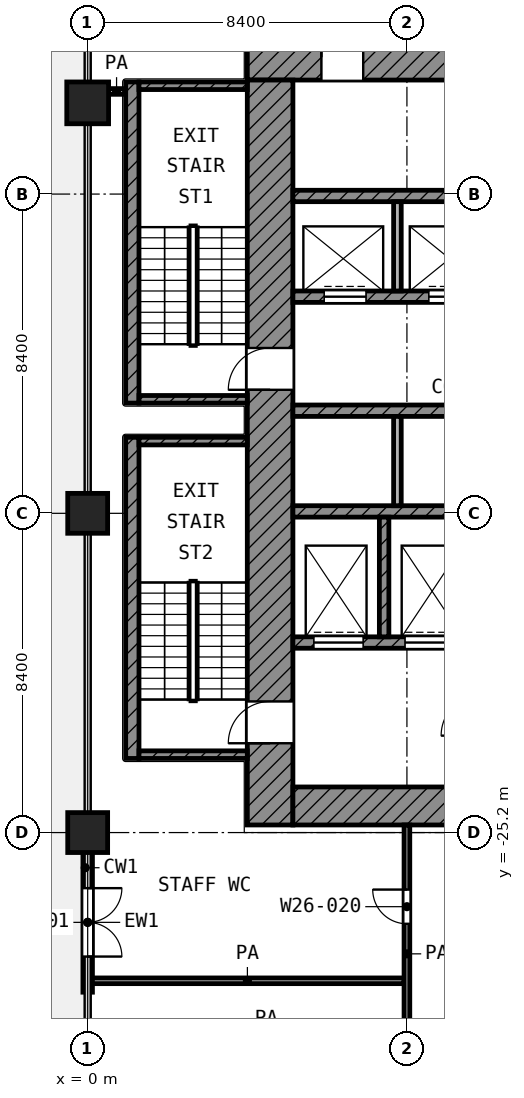
"""IFC4 building model, lengths in metres.
Left out: names, types, materials, properties, quantities, classifications, styles, units other than length and angle.
Written with IfcOpenShell. Run it as: python <this file> out.ifc"""

import sys

from ifc_helpers import new_model, si_unit, direction, frame, frame_2d, origin, origin_2d, place, context, subcontext, project, spatial, rectangle, extrude, element, fill, save


model = new_model("IFC4")
c1 = context("Model", 3, precision=1e-05, world=origin(), true_north=direction((0.0, 1.0)))
c2 = subcontext(c1, "Body", "Model", "MODEL_VIEW")
j1 = project(units=[si_unit("LENGTHUNIT", "METRE"), si_unit("PLANEANGLEUNIT", "RADIAN")], contexts=[c1])
p1 = place(None, origin())
s1 = spatial("IfcSite", under=j1, at=p1, CompositionType="ELEMENT")
p2 = place(p1, origin())
s2 = spatial("IfcBuilding", under=s1, at=p2, CompositionType="ELEMENT")
p3 = place(p2, frame((0.0, 0.0, 115.6)))
s3 = spatial("IfcBuildingStorey", under=s2, at=p3, CompositionType="ELEMENT", Elevation=115.6)
p4 = place(p3, frame((0.0, -6.0, 0.0), z_axis=(0.0, 0.0, 1.0), x_axis=(1.0, 0.0, 0.0)))
e1 = element("IfcColumn", 1, at=p4, inside=s3, PredefinedType="COLUMN", context=c2, shape_type="SweptSolid", body=[
    extrude(rectangle(XDim=1.1, YDim=1.1, at=origin_2d()), origin(), (0.0, 0.0, 1.0), 4.2),
])
for number, where, z_axis, x_axis in (
    (2, (0.0, -16.8, 0.0), (0.0, 0.0, 1.0), (1.0, 0.0, 0.0)),
    (3, (0.0, -25.2, 0.0), (0.0, 0.0, 1.0), (1.0, 0.0, 0.0)),
):
    element("IfcColumn", number, at=place(p3, frame(where, z_axis=z_axis, x_axis=x_axis)), inside=s3, PredefinedType="COLUMN", context=c2, shape_type="SweptSolid", body=[
        extrude(rectangle(XDim=1.05, YDim=1.05, at=origin_2d()), origin(), (0.0, 0.0, 1.0), 4.2),
    ])
p5 = place(p3, frame((0.0, -25.725, 0.0), z_axis=(0.0, 0.0, 1.0), x_axis=(0.0, -1.0, 0.0)))
e4 = element("IfcWall", 4, at=p5, inside=s3, PredefinedType="SOLIDWALL", context=c2, shape_type="SweptSolid", body=[
    extrude(rectangle(XDim=3.675, YDim=0.25, at=frame_2d((1.837, 0.0))), origin(), (0.0, 0.0, 1.0), 3.48),
])
p6 = place(p5, frame((0.938, 0.0, 0.0)))
e5 = element("IfcOpeningElement", 5, at=p6, cuts=e4, PredefinedType="OPENING", context=c2, shape_type="SweptSolid", body=[
    extrude(rectangle(XDim=1.8, YDim=2.1, at=frame_2d((0.9, 1.05))), frame((0.0, 0.135, 0.0), z_axis=(0.0, -1.0, 0.0), x_axis=(1.0, 0.0, 0.0)), (0.0, 0.0, 1.0), 0.27),
])
p7 = place(p3, frame((4.2, -4.8, 0.0), z_axis=(0.0, 0.0, 1.0), x_axis=(1.0, 0.0, 0.0)))
e6 = element("IfcWall", 6, at=p7, inside=s3, PredefinedType="SHEAR", context=c2, shape_type="SweptSolid", body=[
    extrude(rectangle(XDim=20.8, YDim=1.2, at=frame_2d((10.4, 0.0))), origin(), (0.0, 0.0, 1.0), 3.6),
])
p8 = place(p7, frame((1.95, 0.0, 0.0)))
e7 = element("IfcOpeningElement", 7, at=p8, cuts=e6, PredefinedType="OPENING", context=c2, shape_type="SweptSolid", body=[
    extrude(rectangle(XDim=1.1, YDim=2.1, at=frame_2d((0.55, 1.05))), frame((0.0, 0.61, 0.0), z_axis=(0.0, -1.0, 0.0), x_axis=(1.0, 0.0, 0.0)), (0.0, 0.0, 1.0), 1.22),
])
p9 = place(p7, frame((17.95, 0.0, 0.0)))
e8 = element("IfcOpeningElement", 8, at=p9, cuts=e6, PredefinedType="OPENING", context=c2, shape_type="SweptSolid", body=[
    extrude(rectangle(XDim=1.1, YDim=2.1, at=frame_2d((0.55, 1.05))), frame((0.0, 0.61, 0.0), z_axis=(0.0, -1.0, 0.0), x_axis=(1.0, 0.0, 0.0)), (0.0, 0.0, 1.0), 1.22),
])
p10 = place(p3, frame((4.8, -25.0, 0.0), z_axis=(0.0, 0.0, 1.0), x_axis=(0.0, 1.0, 0.0)))
e9 = element("IfcWall", 9, at=p10, inside=s3, PredefinedType="SHEAR", context=c2, shape_type="SweptSolid", body=[
    extrude(rectangle(XDim=19.6, YDim=1.2, at=frame_2d((9.8, 0.0))), origin(), (0.0, 0.0, 1.0), 3.6),
])
p11 = place(p10, frame((11.45, 0.0, 0.0)))
e10 = element("IfcOpeningElement", 10, at=p11, cuts=e9, PredefinedType="OPENING", context=c2, shape_type="SweptSolid", body=[
    extrude(rectangle(XDim=1.1, YDim=2.1, at=frame_2d((0.55, 1.05))), frame((0.0, 0.61, 0.0), z_axis=(0.0, -1.0, 0.0), x_axis=(1.0, 0.0, 0.0)), (0.0, 0.0, 1.0), 1.22),
])
p12 = place(p10, frame((2.15, 0.0, 0.0)))
e11 = element("IfcOpeningElement", 11, at=p12, cuts=e9, PredefinedType="OPENING", context=c2, shape_type="SweptSolid", body=[
    extrude(rectangle(XDim=1.1, YDim=2.1, at=frame_2d((0.55, 1.05))), frame((0.0, 0.61, 0.0), z_axis=(0.0, -1.0, 0.0), x_axis=(1.0, 0.0, 0.0)), (0.0, 0.0, 1.0), 1.22),
])
p13 = place(p3, frame((5.4, -24.5, 0.0), z_axis=(0.0, 0.0, 1.0), x_axis=(1.0, 0.0, 0.0)))
e12 = element("IfcWall", 12, at=p13, inside=s3, PredefinedType="SHEAR", context=c2, shape_type="SweptSolid", body=[
    extrude(rectangle(XDim=18.6, YDim=1.0, at=frame_2d((9.3, 0.0))), origin(), (0.0, 0.0, 1.0), 3.6),
])
p14 = place(p13, frame((6.3, 0.0, 0.0)))
e13 = element("IfcOpeningElement", 13, at=p14, cuts=e12, PredefinedType="OPENING", context=c2, shape_type="SweptSolid", body=[
    extrude(rectangle(XDim=1.8, YDim=2.1, at=frame_2d((0.9, 1.05))), frame((0.0, 0.51, 0.0), z_axis=(0.0, -1.0, 0.0), x_axis=(1.0, 0.0, 0.0)), (0.0, 0.0, 1.0), 1.02),
])
p15 = place(p3, frame((5.4, -8.45, 0.0), z_axis=(0.0, 0.0, 1.0), x_axis=(1.0, 0.0, 0.0)))
e14 = element("IfcWall", 14, at=p15, inside=s3, PredefinedType="SHEAR", context=c2, shape_type="SweptSolid", body=[
    extrude(rectangle(XDim=16.65, YDim=0.3, at=frame_2d((8.325, 0.0))), origin(), (0.0, 0.0, 1.0), 3.6),
])
p16 = place(p3, frame((5.4, -11.1, 0.0), z_axis=(0.0, 0.0, 1.0), x_axis=(1.0, 0.0, 0.0)))
e15 = element("IfcWall", 15, at=p16, inside=s3, PredefinedType="SHEAR", context=c2, shape_type="SweptSolid", body=[
    extrude(rectangle(XDim=16.65, YDim=0.3, at=frame_2d((8.325, 0.0))), origin(), (0.0, 0.0, 1.0), 3.6),
])
p17 = place(p16, frame((0.825, 0.0, 0.0)))
e16 = element("IfcOpeningElement", 16, at=p17, cuts=e15, PredefinedType="OPENING", context=c2, shape_type="SweptSolid", body=[
    extrude(rectangle(XDim=1.1, YDim=2.1, at=frame_2d((0.55, 1.05))), frame((0.0, 0.16, 0.0), z_axis=(0.0, -1.0, 0.0), x_axis=(1.0, 0.0, 0.0)), (0.0, 0.0, 1.0), 0.32),
])
p18 = place(p16, frame((3.575, 0.0, 0.0)))
e17 = element("IfcOpeningElement", 17, at=p18, cuts=e15, PredefinedType="OPENING", context=c2, shape_type="SweptSolid", body=[
    extrude(rectangle(XDim=1.1, YDim=2.1, at=frame_2d((0.55, 1.05))), frame((0.0, 0.16, 0.0), z_axis=(0.0, -1.0, 0.0), x_axis=(1.0, 0.0, 0.0)), (0.0, 0.0, 1.0), 0.32),
])
p19 = place(p16, frame((6.325, 0.0, 0.0)))
e18 = element("IfcOpeningElement", 18, at=p19, cuts=e15, PredefinedType="OPENING", context=c2, shape_type="SweptSolid", body=[
    extrude(rectangle(XDim=1.1, YDim=2.1, at=frame_2d((0.55, 1.05))), frame((0.0, 0.16, 0.0), z_axis=(0.0, -1.0, 0.0), x_axis=(1.0, 0.0, 0.0)), (0.0, 0.0, 1.0), 0.32),
])
p20 = place(p16, frame((9.075, 0.0, 0.0)))
e19 = element("IfcOpeningElement", 19, at=p20, cuts=e15, PredefinedType="OPENING", context=c2, shape_type="SweptSolid", body=[
    extrude(rectangle(XDim=1.1, YDim=2.1, at=frame_2d((0.55, 1.05))), frame((0.0, 0.16, 0.0), z_axis=(0.0, -1.0, 0.0), x_axis=(1.0, 0.0, 0.0)), (0.0, 0.0, 1.0), 0.32),
])
for number, where, z_axis, x_axis in (
    (20, (5.4, -14.1, 0.0), (0.0, 0.0, 1.0), (1.0, 0.0, 0.0)),
    (21, (5.4, -16.75, 0.0), (0.0, 0.0, 1.0), (1.0, 0.0, 0.0)),
):
    element("IfcWall", number, at=place(p3, frame(where, z_axis=z_axis, x_axis=x_axis)), inside=s3, PredefinedType="SHEAR", context=c2, shape_type="SweptSolid", body=[
        extrude(rectangle(XDim=16.65, YDim=0.3, at=frame_2d((8.325, 0.0))), origin(), (0.0, 0.0, 1.0), 3.6),
    ])
p21 = place(p3, frame((5.4, -20.2, 0.0), z_axis=(0.0, 0.0, 1.0), x_axis=(1.0, 0.0, 0.0)))
e22 = element("IfcWall", 22, at=p21, inside=s3, PredefinedType="SHEAR", context=c2, shape_type="SweptSolid", body=[
    extrude(rectangle(XDim=14.65, YDim=0.3, at=frame_2d((7.325, 0.0))), origin(), (0.0, 0.0, 1.0), 3.6),
])
p22 = place(p21, frame((10.55, 0.0, 0.0)))
e23 = element("IfcOpeningElement", 23, at=p22, cuts=e22, PredefinedType="OPENING", context=c2, shape_type="SweptSolid", body=[
    extrude(rectangle(XDim=1.3, YDim=2.1, at=frame_2d((0.65, 1.05))), frame((0.0, 0.16, 0.0), z_axis=(0.0, -1.0, 0.0), x_axis=(1.0, 0.0, 0.0)), (0.0, 0.0, 1.0), 0.32),
])
p23 = place(p21, frame((12.95, 0.0, 0.0)))
e24 = element("IfcOpeningElement", 24, at=p23, cuts=e22, PredefinedType="OPENING", context=c2, shape_type="SweptSolid", body=[
    extrude(rectangle(XDim=1.3, YDim=2.1, at=frame_2d((0.65, 1.05))), frame((0.0, 0.16, 0.0), z_axis=(0.0, -1.0, 0.0), x_axis=(1.0, 0.0, 0.0)), (0.0, 0.0, 1.0), 0.32),
])
p24 = place(p21, frame((0.55, 0.0, 0.0)))
e25 = element("IfcOpeningElement", 25, at=p24, cuts=e22, PredefinedType="OPENING", context=c2, shape_type="SweptSolid", body=[
    extrude(rectangle(XDim=1.3, YDim=2.1, at=frame_2d((0.65, 1.05))), frame((0.0, 0.16, 0.0), z_axis=(0.0, -1.0, 0.0), x_axis=(1.0, 0.0, 0.0)), (0.0, 0.0, 1.0), 0.32),
])
p25 = place(p21, frame((2.95, 0.0, 0.0)))
e26 = element("IfcOpeningElement", 26, at=p25, cuts=e22, PredefinedType="OPENING", context=c2, shape_type="SweptSolid", body=[
    extrude(rectangle(XDim=1.3, YDim=2.1, at=frame_2d((0.65, 1.05))), frame((0.0, 0.16, 0.0), z_axis=(0.0, -1.0, 0.0), x_axis=(1.0, 0.0, 0.0)), (0.0, 0.0, 1.0), 0.32),
])
p26 = place(p21, frame((6.55, 0.0, 0.0)))
e27 = element("IfcOpeningElement", 27, at=p26, cuts=e22, PredefinedType="OPENING", context=c2, shape_type="SweptSolid", body=[
    extrude(rectangle(XDim=0.9, YDim=2.1, at=frame_2d((0.45, 1.05))), frame((0.0, 0.16, 0.0), z_axis=(0.0, -1.0, 0.0), x_axis=(1.0, 0.0, 0.0)), (0.0, 0.0, 1.0), 0.32),
])
p27 = place(p21, frame((8.95, 0.0, 0.0)))
e28 = element("IfcOpeningElement", 28, at=p27, cuts=e22, PredefinedType="OPENING", context=c2, shape_type="SweptSolid", body=[
    extrude(rectangle(XDim=0.9, YDim=2.1, at=frame_2d((0.45, 1.05))), frame((0.0, 0.16, 0.0), z_axis=(0.0, -1.0, 0.0), x_axis=(1.0, 0.0, 0.0)), (0.0, 0.0, 1.0), 0.32),
])
p28 = place(p3, frame((7.8, -20.05, 0.0), z_axis=(0.0, 0.0, 1.0), x_axis=(0.0, 1.0, 0.0)))
e29 = element("IfcWall", 29, at=p28, inside=s3, PredefinedType="SHEAR", context=c2, shape_type="SweptSolid", body=[
    extrude(rectangle(XDim=3.15, YDim=0.25, at=frame_2d((1.575, 0.0))), origin(), (0.0, 0.0, 1.0), 3.6),
])
p29 = place(p3, frame((8.15, -10.95, 0.0), z_axis=(0.0, 0.0, 1.0), x_axis=(0.0, 1.0, 0.0)))
e30 = element("IfcWall", 30, at=p29, inside=s3, PredefinedType="PARTITIONING", context=c2, shape_type="SweptSolid", body=[
    extrude(rectangle(XDim=2.35, YDim=0.2, at=frame_2d((1.175, 0.0))), origin(), (0.0, 0.0, 1.0), 3.6),
])
p30 = place(p3, frame((8.15, -16.6, 0.0), z_axis=(0.0, 0.0, 1.0), x_axis=(0.0, 1.0, 0.0)))
e31 = element("IfcWall", 31, at=p30, inside=s3, PredefinedType="PARTITIONING", context=c2, shape_type="SweptSolid", body=[
    extrude(rectangle(XDim=2.35, YDim=0.2, at=frame_2d((1.175, 0.0))), origin(), (0.0, 0.0, 1.0), 3.6),
])
p31 = place(p3, frame((1.175, -13.9, 0.0), z_axis=(0.0, 0.0, 1.0), x_axis=(0.0, 1.0, 0.0)))
e32 = element("IfcWall", 32, at=p31, inside=s3, PredefinedType="SHEAR", context=c2, shape_type="SweptSolid", body=[
    extrude(rectangle(XDim=8.45, YDim=0.35, at=frame_2d((4.225, 0.0))), origin(), (0.0, 0.0, 1.0), 3.6),
])
for number, where, z_axis, x_axis in (
    (33, (1.35, -5.55, 0.0), (0.0, 0.0, 1.0), (1.0, 0.0, 0.0)),
    (34, (1.35, -13.8, 0.0), (0.0, 0.0, 1.0), (1.0, 0.0, 0.0)),
):
    element("IfcWall", number, at=place(p3, frame(where, z_axis=z_axis, x_axis=x_axis)), inside=s3, PredefinedType="SHEAR", context=c2, shape_type="SweptSolid", body=[
        extrude(rectangle(XDim=2.85, YDim=0.2, at=frame_2d((1.425, 0.0))), origin(), (0.0, 0.0, 1.0), 3.6),
    ])
p32 = place(p3, frame((1.175, -23.25, 0.0), z_axis=(0.0, 0.0, 1.0), x_axis=(0.0, 1.0, 0.0)))
e35 = element("IfcWall", 35, at=p32, inside=s3, PredefinedType="SHEAR", context=c2, shape_type="SweptSolid", body=[
    extrude(rectangle(XDim=8.45, YDim=0.35, at=frame_2d((4.225, 0.0))), origin(), (0.0, 0.0, 1.0), 3.6),
])
for number, where, z_axis, x_axis in (
    (36, (1.35, -14.9, 0.0), (0.0, 0.0, 1.0), (1.0, 0.0, 0.0)),
    (37, (1.35, -23.15, 0.0), (0.0, 0.0, 1.0), (1.0, 0.0, 0.0)),
):
    element("IfcWall", number, at=place(p3, frame(where, z_axis=z_axis, x_axis=x_axis)), inside=s3, PredefinedType="SHEAR", context=c2, shape_type="SweptSolid", body=[
        extrude(rectangle(XDim=2.85, YDim=0.2, at=frame_2d((1.425, 0.0))), origin(), (0.0, 0.0, 1.0), 3.6),
    ])
p33 = place(p3, frame((0.08, -29.1, 0.0), z_axis=(0.0, 0.0, 1.0), x_axis=(1.0, 0.0, 0.0)))
e38 = element("IfcWall", 38, at=p33, inside=s3, PredefinedType="PARTITIONING", context=c2, shape_type="SweptSolid", body=[
    extrude(rectangle(XDim=8.245, YDim=0.15, at=frame_2d((4.123, 0.0))), origin(), (0.0, 0.0, 1.0), 3.6),
])
p34 = place(p3, frame((0.55, -5.7, 0.0), z_axis=(0.0, 0.0, 1.0), x_axis=(1.0, 0.0, 0.0)))
e39 = element("IfcWall", 39, at=p34, inside=s3, PredefinedType="PARTITIONING", context=c2, shape_type="SweptSolid", body=[
    extrude(rectangle(XDim=0.42, YDim=0.15, at=frame_2d((0.21, 0.0))), origin(), (0.0, 0.0, 1.0), 3.6),
])
p35 = place(p3, frame((8.4, -31.782, 0.0), z_axis=(0.0, 0.0, 1.0), x_axis=(0.0, 1.0, 0.0)))
e40 = element("IfcWall", 40, at=p35, inside=s3, PredefinedType="PARTITIONING", context=c2, shape_type="SweptSolid", body=[
    extrude(rectangle(XDim=6.782, YDim=0.15, at=frame_2d((3.391, 0.0))), origin(), (0.0, 0.0, 1.0), 3.6),
])
p36 = place(p35, frame((4.182, 0.0, 0.0)))
e41 = element("IfcOpeningElement", 41, at=p36, cuts=e40, PredefinedType="OPENING", context=c2, shape_type="SweptSolid", body=[
    extrude(rectangle(XDim=0.9, YDim=2.1, at=frame_2d((0.45, 1.05))), frame((0.0, 0.085, 0.0), z_axis=(0.0, -1.0, 0.0), x_axis=(1.0, 0.0, 0.0)), (0.0, 0.0, 1.0), 0.17),
])
p37 = place(p6, origin())
e42 = element("IfcDoor", 42, at=p37, inside=s3, OperationType="DOUBLE_DOOR_SINGLE_SWING", PredefinedType="DOOR", context=c2, shape_type="SweptSolid", body=[
    extrude(rectangle(XDim=1.8, YDim=2.1, at=frame_2d((0.9, 1.05))), frame((0.0, 0.025, 0.0), z_axis=(0.0, -1.0, 0.0), x_axis=(1.0, 0.0, 0.0)), (0.0, 0.0, 1.0), 0.05),
])
fill(e5, e42)
p38 = place(p17, origin())
e43 = element("IfcDoor", 43, at=p38, inside=s3, OperationType="DOUBLE_DOOR_SLIDING", PredefinedType="DOOR", context=c2, shape_type="SweptSolid", body=[
    extrude(rectangle(XDim=1.1, YDim=2.1, at=frame_2d((0.55, 1.05))), frame((0.0, 0.025, 0.0), z_axis=(0.0, -1.0, 0.0), x_axis=(1.0, 0.0, 0.0)), (0.0, 0.0, 1.0), 0.05),
])
fill(e16, e43)
p39 = place(p18, origin())
e44 = element("IfcDoor", 44, at=p39, inside=s3, OperationType="DOUBLE_DOOR_SLIDING", PredefinedType="DOOR", context=c2, shape_type="SweptSolid", body=[
    extrude(rectangle(XDim=1.1, YDim=2.1, at=frame_2d((0.55, 1.05))), frame((0.0, 0.025, 0.0), z_axis=(0.0, -1.0, 0.0), x_axis=(1.0, 0.0, 0.0)), (0.0, 0.0, 1.0), 0.05),
])
fill(e17, e44)
p40 = place(p24, origin())
e45 = element("IfcDoor", 45, at=p40, inside=s3, OperationType="DOUBLE_DOOR_SLIDING", PredefinedType="DOOR", context=c2, shape_type="SweptSolid", body=[
    extrude(rectangle(XDim=1.3, YDim=2.1, at=frame_2d((0.65, 1.05))), frame((0.0, 0.025, 0.0), z_axis=(0.0, -1.0, 0.0), x_axis=(1.0, 0.0, 0.0)), (0.0, 0.0, 1.0), 0.05),
])
fill(e25, e45)
p41 = place(p25, origin())
e46 = element("IfcDoor", 46, at=p41, inside=s3, OperationType="DOUBLE_DOOR_SLIDING", PredefinedType="DOOR", context=c2, shape_type="SweptSolid", body=[
    extrude(rectangle(XDim=1.3, YDim=2.1, at=frame_2d((0.65, 1.05))), frame((0.0, 0.025, 0.0), z_axis=(0.0, -1.0, 0.0), x_axis=(1.0, 0.0, 0.0)), (0.0, 0.0, 1.0), 0.05),
])
fill(e26, e46)
p42 = place(p11, origin())
e47 = element("IfcDoor", 47, at=p42, inside=s3, OperationType="SINGLE_SWING_LEFT", PredefinedType="DOOR", context=c2, shape_type="SweptSolid", body=[
    extrude(rectangle(XDim=1.1, YDim=2.1, at=frame_2d((0.55, 1.05))), frame((0.0, 0.025, 0.0), z_axis=(0.0, -1.0, 0.0), x_axis=(1.0, 0.0, 0.0)), (0.0, 0.0, 1.0), 0.05),
])
fill(e10, e47)
p43 = place(p12, origin())
e48 = element("IfcDoor", 48, at=p43, inside=s3, OperationType="SINGLE_SWING_LEFT", PredefinedType="DOOR", context=c2, shape_type="SweptSolid", body=[
    extrude(rectangle(XDim=1.1, YDim=2.1, at=frame_2d((0.55, 1.05))), frame((0.0, 0.025, 0.0), z_axis=(0.0, -1.0, 0.0), x_axis=(1.0, 0.0, 0.0)), (0.0, 0.0, 1.0), 0.05),
])
fill(e11, e48)
p44 = place(p8, origin())
e49 = element("IfcDoor", 49, at=p44, inside=s3, OperationType="SINGLE_SWING_LEFT", PredefinedType="DOOR", context=c2, shape_type="SweptSolid", body=[
    extrude(rectangle(XDim=1.1, YDim=2.1, at=frame_2d((0.55, 1.05))), frame((0.0, 0.025, 0.0), z_axis=(0.0, -1.0, 0.0), x_axis=(1.0, 0.0, 0.0)), (0.0, 0.0, 1.0), 0.05),
])
fill(e7, e49)
p45 = place(p36, origin())
e50 = element("IfcDoor", 50, at=p45, inside=s3, OperationType="SINGLE_SWING_RIGHT", PredefinedType="DOOR", context=c2, shape_type="SweptSolid", body=[
    extrude(rectangle(XDim=0.9, YDim=2.1, at=frame_2d((0.45, 1.05))), frame((0.0, 0.025, 0.0), z_axis=(0.0, -1.0, 0.0), x_axis=(1.0, 0.0, 0.0)), (0.0, 0.0, 1.0), 0.05),
])
fill(e41, e50)
save(model, sys.argv[1])
